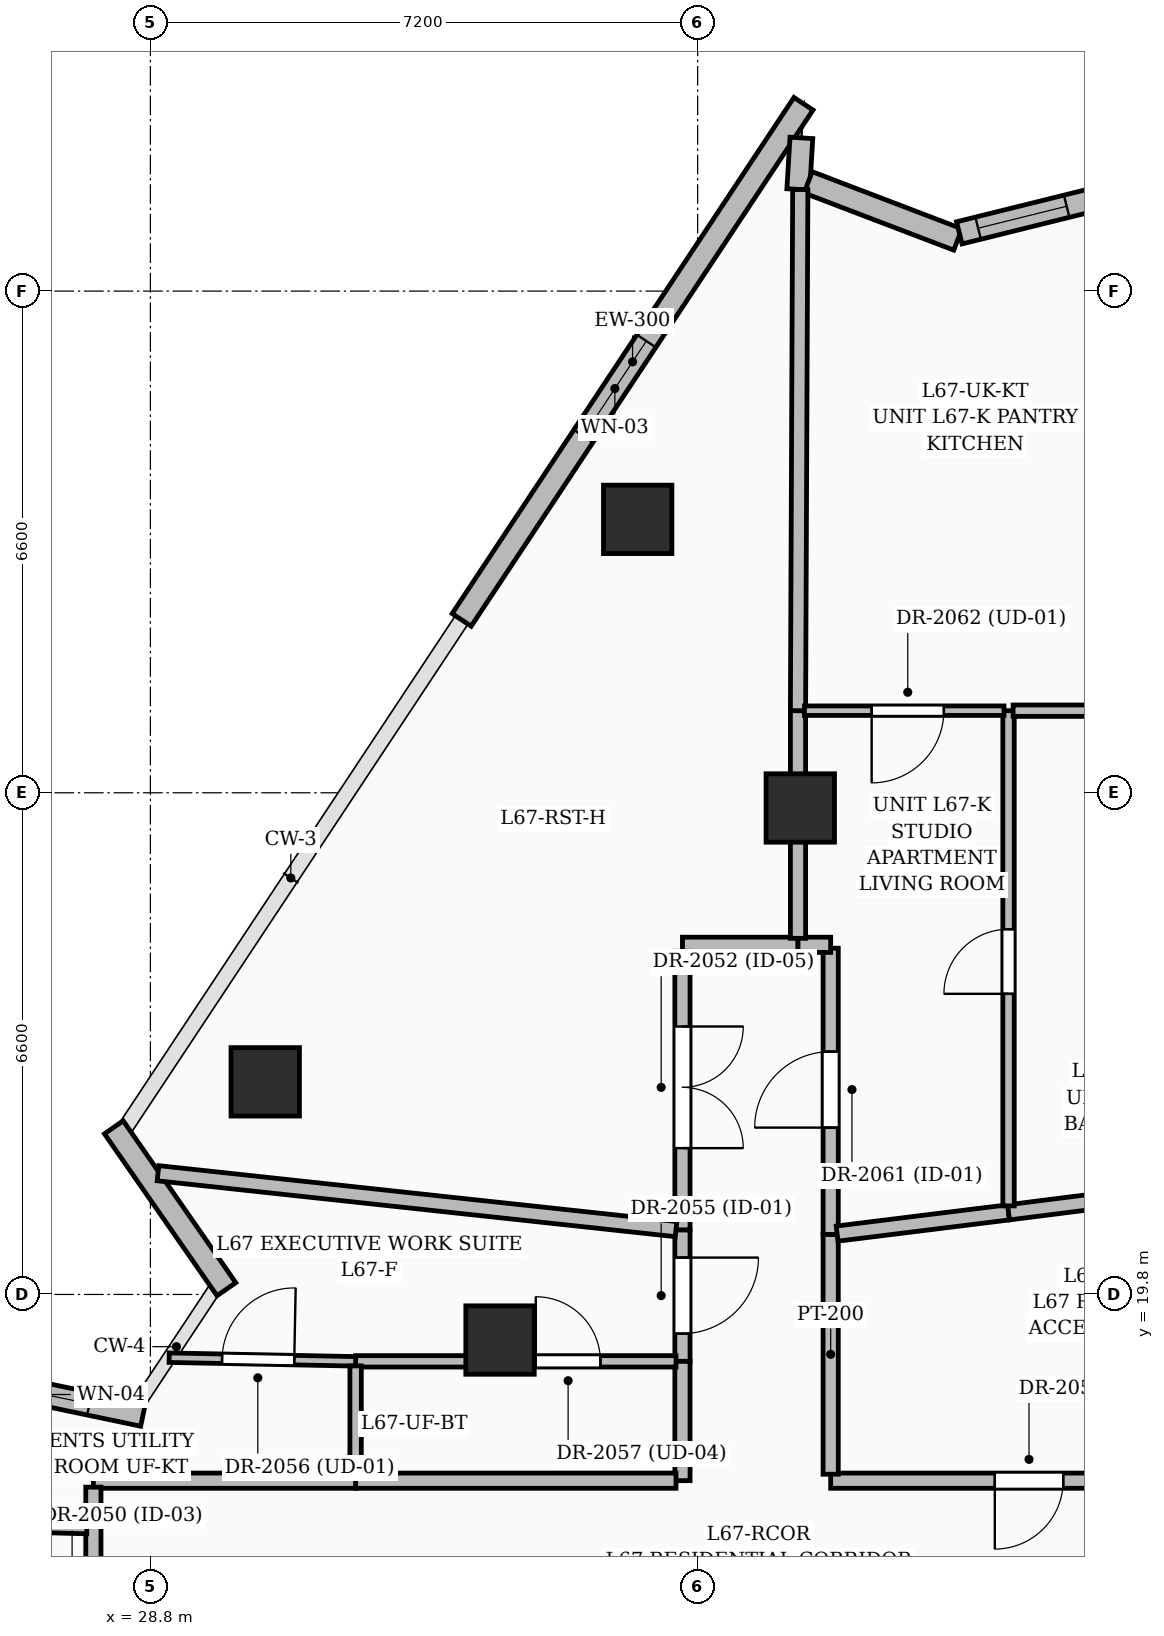
"""IFC4 building model, lengths in metres.
Left out: names, types, materials, properties, quantities, classifications, styles, units other than length and angle.
Written with IfcOpenShell. Run it as: python <this file> out.ifc"""

import sys

from ifc_helpers import new_model, si_unit, direction, frame, frame_2d, origin, origin_2d, place, context, subcontext, project, spatial, rectangle, extrude, element, fill, save


model = new_model("IFC4")
c1 = context("Model", 3, precision=1e-05, world=origin(), true_north=direction((0.0, 1.0)))
c2 = subcontext(c1, "Body", "Model", "MODEL_VIEW")
j1 = project(units=[si_unit("LENGTHUNIT", "METRE"), si_unit("PLANEANGLEUNIT", "RADIAN")], contexts=[c1])
p1 = place(None, origin())
s1 = spatial("IfcSite", under=j1, at=p1, CompositionType="ELEMENT")
p2 = place(p1, origin())
s2 = spatial("IfcBuilding", under=s1, at=p2, CompositionType="ELEMENT")
p3 = place(p2, frame((0.0, 0.0, 259.5)))
s3 = spatial("IfcBuildingStorey", under=s2, at=p3, CompositionType="ELEMENT", Elevation=259.5)
for number, where, z_axis, x_axis in (
    (1, (37.35, 26.2, 0.0), (0.0, 0.0, 1.0), (1.0, 0.0, 0.0)),
    (2, (33.4, 19.2, 0.0), (0.0, 0.0, 1.0), (1.0, 0.0, 0.0)),
    (3, (35.211, 29.997, 0.0), (0.0, 0.0, 1.0), (1.0, 0.0, 0.0)),
    (4, (30.311, 22.597, 0.0), (0.0, 0.0, 1.0), (1.0, 0.0, 0.0)),
):
    element("IfcColumn", number, at=place(p3, frame(where, z_axis=z_axis, x_axis=x_axis)), inside=s3, PredefinedType="COLUMN", context=c2, shape_type="SweptSolid", body=[
        extrude(rectangle(XDim=0.9, YDim=0.9, at=origin_2d()), origin(), (0.0, 0.0, 1.0), 3.75),
    ])
p4 = place(p3, frame((26.164, 18.745, 0.0), z_axis=(0.0, 0.0, 1.0), x_axis=(0.978800719283, -0.204814921162, 0.0)))
e5 = element("IfcWall", 5, at=p4, inside=s3, PredefinedType="SOLIDWALL", context=c2, shape_type="SweptSolid", body=[
    extrude(rectangle(XDim=2.594, YDim=0.3, at=frame_2d((1.297, 0.0))), origin(), (0.0, 0.0, 1.0), 2.825),
])
p5 = place(p4, frame((0.675, 0.0, 0.8)))
e6 = element("IfcOpeningElement", 6, at=p5, cuts=e5, PredefinedType="OPENING", context=c2, shape_type="SweptSolid", body=[
    extrude(rectangle(XDim=1.2, YDim=1.8, at=frame_2d((0.6, 0.9))), frame((0.0, 0.16, 0.0), z_axis=(0.0, -1.0, 0.0), x_axis=(1.0, 0.0, 0.0)), (0.0, 0.0, 1.0), 0.32),
])
p6 = place(p3, frame((29.8, 19.869, 0.0), z_axis=(0.0, 0.0, 1.0), x_axis=(-0.570863153193, 0.821045224288, 0.0)))
e7 = element("IfcWall", 7, at=p6, inside=s3, PredefinedType="SOLIDWALL", context=c2, shape_type="SweptSolid", body=[
    extrude(rectangle(XDim=2.594, YDim=0.3, at=frame_2d((1.297, 0.0))), origin(), (0.0, 0.0, 1.0), 2.825),
])
p7 = place(p3, frame((32.896, 28.675, 0.0), z_axis=(0.0, 0.0, 1.0), x_axis=(0.552110297452, 0.83377108336, 0.0)))
e8 = element("IfcWall", 8, at=p7, inside=s3, PredefinedType="SOLIDWALL", context=c2, shape_type="SweptSolid", body=[
    extrude(rectangle(XDim=8.144, YDim=0.3, at=frame_2d((4.072, 0.0))), origin(), (0.0, 0.0, 1.0), 3.5),
])
p8 = place(p7, frame((2.9, 0.0, 0.6)))
e9 = element("IfcOpeningElement", 9, at=p8, cuts=e8, PredefinedType="OPENING", context=c2, shape_type="SweptSolid", body=[
    extrude(rectangle(XDim=1.5, YDim=2.1, at=frame_2d((0.75, 1.05))), frame((0.0, 0.16, 0.0), z_axis=(0.0, -1.0, 0.0), x_axis=(1.0, 0.0, 0.0)), (0.0, 0.0, 1.0), 0.32),
])
p9 = place(p3, frame((37.365, 35.016, 0.0), z_axis=(0.0, 0.0, 1.0), x_axis=(-0.060701101821, -0.998155987929, 0.0)))
e10 = element("IfcWall", 10, at=p9, inside=s3, PredefinedType="SOLIDWALL", context=c2, shape_type="SweptSolid", body=[
    extrude(rectangle(XDim=0.68, YDim=0.3, at=frame_2d((0.34, 0.0))), origin(), (0.0, 0.0, 1.0), 3.5),
])
p10 = place(p3, frame((37.454, 34.431, 0.0), z_axis=(0.0, 0.0, 1.0), x_axis=(0.934285742141, -0.356525107155, 0.0)))
e11 = element("IfcWall", 11, at=p10, inside=s3, PredefinedType="SOLIDWALL", context=c2, shape_type="SweptSolid", body=[
    extrude(rectangle(XDim=2.108, YDim=0.3, at=frame_2d((1.054, 0.0))), origin(), (0.0, 0.0, 1.0), 3.5),
])
p11 = place(p3, frame((39.442, 33.766, 0.0), z_axis=(0.0, 0.0, 1.0), x_axis=(0.970636719037, 0.240550118805, 0.0)))
e12 = element("IfcWall", 12, at=p11, inside=s3, PredefinedType="SOLIDWALL", context=c2, shape_type="SweptSolid", body=[
    extrude(rectangle(XDim=2.084, YDim=0.3, at=frame_2d((1.042, 0.0))), origin(), (0.0, 0.0, 1.0), 3.5),
])
p12 = place(p11, frame((0.255, 0.0, 0.8)))
e13 = element("IfcOpeningElement", 13, at=p12, cuts=e12, PredefinedType="OPENING", context=c2, shape_type="SweptSolid", body=[
    extrude(rectangle(XDim=1.2, YDim=1.8, at=frame_2d((0.6, 0.9))), frame((0.0, 0.16, 0.0), z_axis=(0.0, -1.0, 0.0), x_axis=(1.0, 0.0, 0.0)), (0.0, 0.0, 1.0), 0.32),
])
p13 = place(p3, frame((28.05, 16.75, 0.0), z_axis=(0.0, 0.0, 1.0), x_axis=(0.0, -1.0, 0.0)))
e14 = element("IfcWall", 14, at=p13, inside=s3, PredefinedType="PARTITIONING", context=c2, shape_type="SweptSolid", body=[
    extrude(rectangle(XDim=1.7, YDim=0.2, at=frame_2d((0.85, 0.0))), origin(), (0.0, 0.0, 1.0), 3.5),
])
p14 = place(p13, frame((0.556, 0.0, 0.0)))
e15 = element("IfcOpeningElement", 15, at=p14, cuts=e14, PredefinedType="OPENING", context=c2, shape_type="SweptSolid", body=[
    extrude(rectangle(XDim=0.9, YDim=2.1, at=frame_2d((0.45, 1.05))), frame((0.0, 0.11, 0.0), z_axis=(0.0, -1.0, 0.0), x_axis=(1.0, 0.0, 0.0)), (0.0, 0.0, 1.0), 0.22),
])
p15 = place(p3, frame((35.8, 20.65, 0.0), z_axis=(0.0, 0.0, 1.0), x_axis=(0.0, -1.0, 0.0)))
e16 = element("IfcWall", 16, at=p15, inside=s3, PredefinedType="PARTITIONING", context=c2, shape_type="SweptSolid", body=[
    extrude(rectangle(XDim=1.73, YDim=0.2, at=frame_2d((0.865, 0.0))), origin(), (0.0, 0.0, 1.0), 3.5),
])
p16 = place(p15, frame((0.365, 0.0, 0.0)))
e17 = element("IfcOpeningElement", 17, at=p16, cuts=e16, PredefinedType="OPENING", context=c2, shape_type="SweptSolid", body=[
    extrude(rectangle(XDim=1.0, YDim=2.2, at=frame_2d((0.5, 1.1))), frame((0.0, 0.11, 0.0), z_axis=(0.0, -1.0, 0.0), x_axis=(1.0, 0.0, 0.0)), (0.0, 0.0, 1.0), 0.22),
])
p17 = place(p3, frame((35.8, 18.92, 0.0), z_axis=(0.0, 0.0, 1.0), x_axis=(0.0, -1.0, 0.0)))
e18 = element("IfcWall", 18, at=p17, inside=s3, PredefinedType="PARTITIONING", context=c2, shape_type="SweptSolid", body=[
    extrude(rectangle(XDim=1.57, YDim=0.2, at=frame_2d((0.785, 0.0))), origin(), (0.0, 0.0, 1.0), 3.5),
])
p18 = place(p3, frame((35.715, 17.35, 0.0), z_axis=(0.0, 0.0, 1.0), x_axis=(-1.0, 0.0, 0.0)))
e19 = element("IfcWall", 19, at=p18, inside=s3, PredefinedType="PARTITIONING", context=c2, shape_type="SweptSolid", body=[
    extrude(rectangle(XDim=4.215, YDim=0.2, at=frame_2d((2.107, 0.0))), origin(), (0.0, 0.0, 1.0), 2.685),
])
p19 = place(p3, frame((31.5, 17.35, 0.0), z_axis=(0.0, 0.0, 1.0), x_axis=(-1.0, 0.0, 0.0)))
e20 = element("IfcWall", 20, at=p19, inside=s3, PredefinedType="PARTITIONING", context=c2, shape_type="SweptSolid", body=[
    extrude(rectangle(XDim=3.45, YDim=0.2, at=frame_2d((1.725, 0.0))), origin(), (0.0, 0.0, 1.0), 3.5),
])
p20 = place(p3, frame((28.05, 17.265, 0.0), z_axis=(0.0, 0.0, 1.0), x_axis=(0.0, -1.0, 0.0)))
e21 = element("IfcWall", 21, at=p20, inside=s3, PredefinedType="PARTITIONING", context=c2, shape_type="SweptSolid", body=[
    extrude(rectangle(XDim=0.515, YDim=0.2, at=frame_2d((0.257, 0.0))), origin(), (0.0, 0.0, 1.0), 3.5),
])
p21 = place(p3, frame((42.85, 17.35, 0.0), z_axis=(0.0, 0.0, 1.0), x_axis=(-1.0, 0.0, 0.0)))
e22 = element("IfcWall", 22, at=p21, inside=s3, PredefinedType="PARTITIONING", context=c2, shape_type="SweptSolid", body=[
    extrude(rectangle(XDim=5.1, YDim=0.2, at=frame_2d((2.55, 0.0))), origin(), (0.0, 0.0, 1.0), 3.5),
])
p22 = place(p21, frame((2.041, 0.0, 0.0)))
e23 = element("IfcOpeningElement", 23, at=p22, cuts=e22, PredefinedType="OPENING", context=c2, shape_type="SweptSolid", body=[
    extrude(rectangle(XDim=0.9, YDim=2.1, at=frame_2d((0.45, 1.05))), frame((0.0, 0.11, 0.0), z_axis=(0.0, -1.0, 0.0), x_axis=(1.0, 0.0, 0.0)), (0.0, 0.0, 1.0), 0.22),
])
p23 = place(p3, frame((37.75, 17.435, 0.0), z_axis=(0.0, 0.0, 1.0), x_axis=(0.0, 1.0, 0.0)))
e24 = element("IfcWall", 24, at=p23, inside=s3, PredefinedType="PARTITIONING", context=c2, shape_type="SweptSolid", body=[
    extrude(rectangle(XDim=3.155, YDim=0.2, at=frame_2d((1.578, 0.0))), origin(), (0.0, 0.0, 1.0), 3.5),
])
p24 = place(p3, frame((37.32, 24.4, 0.0), z_axis=(0.0, 0.0, 1.0), x_axis=(-1.0, 0.0, 0.0)))
e25 = element("IfcWall", 25, at=p24, inside=s3, PredefinedType="PARTITIONING", context=c2, shape_type="SweptSolid", body=[
    extrude(rectangle(XDim=1.52, YDim=0.2, at=frame_2d((0.76, 0.0))), origin(), (0.0, 0.0, 1.0), 2.685),
])
p25 = place(p3, frame((35.8, 24.315, 0.0), z_axis=(0.0, 0.0, 1.0), x_axis=(0.0, -1.0, 0.0)))
e26 = element("IfcWall", 26, at=p25, inside=s3, PredefinedType="PARTITIONING", context=c2, shape_type="SweptSolid", body=[
    extrude(rectangle(XDim=3.665, YDim=0.2, at=frame_2d((1.833, 0.0))), origin(), (0.0, 0.0, 1.0), 2.685),
])
p26 = place(p25, frame((0.99, 0.0, 0.0)))
e27 = element("IfcOpeningElement", 27, at=p26, cuts=e26, PredefinedType="OPENING", context=c2, shape_type="SweptSolid", body=[
    extrude(rectangle(XDim=1.6, YDim=2.3, at=frame_2d((0.8, 1.15))), frame((0.0, 0.11, 0.0), z_axis=(0.0, -1.0, 0.0), x_axis=(1.0, 0.0, 0.0)), (0.0, 0.0, 1.0), 0.22),
])
p27 = place(p3, frame((37.75, 20.59, 0.0), z_axis=(0.0, 0.0, 1.0), x_axis=(0.0, 1.0, 0.0)))
e28 = element("IfcWall", 28, at=p27, inside=s3, PredefinedType="PARTITIONING", context=c2, shape_type="SweptSolid", body=[
    extrude(rectangle(XDim=3.765, YDim=0.2, at=frame_2d((1.882, 0.0))), origin(), (0.0, 0.0, 1.0), 3.5),
])
p28 = place(p27, frame((1.405, 0.0, 0.0)))
e29 = element("IfcOpeningElement", 29, at=p28, cuts=e28, PredefinedType="OPENING", context=c2, shape_type="SweptSolid", body=[
    extrude(rectangle(XDim=1.0, YDim=2.2, at=frame_2d((0.5, 1.1))), frame((0.0, 0.11, 0.0), z_axis=(0.0, -1.0, 0.0), x_axis=(1.0, 0.0, 0.0)), (0.0, 0.0, 1.0), 0.22),
])
p29 = place(p3, frame((37.75, 24.4, 0.0), z_axis=(0.0, 0.0, 1.0), x_axis=(-1.0, 0.0, 0.0)))
e30 = element("IfcWall", 30, at=p29, inside=s3, PredefinedType="PARTITIONING", context=c2, shape_type="SweptSolid", body=[
    extrude(rectangle(XDim=0.43, YDim=0.2, at=frame_2d((0.215, 0.0))), origin(), (0.0, 0.0, 1.0), 3.5),
])
p30 = place(p3, frame((27.965, 16.751, 0.0), z_axis=(0.0, 0.0, 1.0), x_axis=(-0.99966592062, 0.025846608096, 0.0)))
e31 = element("IfcWall", 31, at=p30, inside=s3, PredefinedType="PARTITIONING", context=c2, shape_type="SweptSolid", body=[
    extrude(rectangle(XDim=2.777, YDim=0.2, at=frame_2d((1.389, 0.0))), origin(), (0.0, 0.0, 1.0), 3.5),
])
p31 = place(p3, frame((31.5, 18.92, 0.0), z_axis=(0.0, 0.0, 1.0), x_axis=(1.0, 0.0, 0.0)))
e32 = element("IfcWall", 32, at=p31, inside=s3, PredefinedType="PARTITIONING", context=c2, shape_type="SweptSolid", body=[
    extrude(rectangle(XDim=4.215, YDim=0.15, at=frame_2d((2.107, 0.0))), origin(), (0.0, 0.0, 1.0), 3.5),
])
p32 = place(p31, frame((2.371, 0.0, 0.0)))
e33 = element("IfcOpeningElement", 33, at=p32, cuts=e32, PredefinedType="OPENING", context=c2, shape_type="SweptSolid", body=[
    extrude(rectangle(XDim=0.85, YDim=2.1, at=frame_2d((0.425, 1.05))), frame((0.0, 0.085, 0.0), z_axis=(0.0, -1.0, 0.0), x_axis=(1.0, 0.0, 0.0)), (0.0, 0.0, 1.0), 0.17),
])
p33 = place(p3, frame((29.047, 18.968, 0.0), z_axis=(0.0, 0.0, 1.0), x_axis=(0.999807821657, -0.019604074934, 0.0)))
e34 = element("IfcWall", 34, at=p33, inside=s3, PredefinedType="PARTITIONING", context=c2, shape_type="SweptSolid", body=[
    extrude(rectangle(XDim=2.453, YDim=0.125, at=frame_2d((1.227, 0.0))), origin(), (0.0, 0.0, 1.0), 3.5),
])
p34 = place(p33, frame((0.696, 0.0, 0.0)))
e35 = element("IfcOpeningElement", 35, at=p34, cuts=e34, PredefinedType="OPENING", context=c2, shape_type="SweptSolid", body=[
    extrude(rectangle(XDim=0.95, YDim=2.2, at=frame_2d((0.475, 1.1))), frame((0.0, 0.072, 0.0), z_axis=(0.0, -1.0, 0.0), x_axis=(1.0, 0.0, 0.0)), (0.0, 0.0, 1.0), 0.145),
])
p35 = place(p3, frame((35.716, 20.66, 0.0), z_axis=(0.0, 0.0, 1.0), x_axis=(-0.994230064401, 0.107268723501, 0.0)))
e36 = element("IfcWall", 36, at=p35, inside=s3, PredefinedType="PARTITIONING", context=c2, shape_type="SweptSolid", body=[
    extrude(rectangle(XDim=6.855, YDim=0.2, at=frame_2d((3.428, 0.0))), origin(), (0.0, 0.0, 1.0), 2.685),
])
p36 = place(p3, frame((31.5, 18.86, 0.0), z_axis=(0.0, 0.0, 1.0), x_axis=(0.0, -1.0, 0.0)))
e37 = element("IfcWall", 37, at=p36, inside=s3, PredefinedType="PARTITIONING", context=c2, shape_type="SweptSolid", body=[
    extrude(rectangle(XDim=1.425, YDim=0.15, at=frame_2d((0.712, 0.0))), origin(), (0.0, 0.0, 1.0), 3.5),
])
p37 = place(p3, frame((40.09, 20.88, 0.0), z_axis=(0.0, 0.0, 1.0), x_axis=(-0.992420982951, -0.122884468503, 0.0)))
e38 = element("IfcWall", 38, at=p37, inside=s3, PredefinedType="PARTITIONING", context=c2, shape_type="SweptSolid", body=[
    extrude(rectangle(XDim=2.273, YDim=0.2, at=frame_2d((1.136, 0.0))), origin(), (0.0, 0.0, 1.0), 3.5),
])
p38 = place(p3, frame((42.766, 21.219, 0.0), z_axis=(0.0, 0.0, 1.0), x_axis=(-0.992052034516, -0.12582829893, 0.0)))
e39 = element("IfcWall", 39, at=p38, inside=s3, PredefinedType="PARTITIONING", context=c2, shape_type="SweptSolid", body=[
    extrude(rectangle(XDim=2.697, YDim=0.2, at=frame_2d((1.349, 0.0))), origin(), (0.0, 0.0, 1.0), 3.5),
])
p39 = place(p3, frame((37.32, 24.485, 0.0), z_axis=(0.0, 0.0, 1.0), x_axis=(0.0, 1.0, 0.0)))
e40 = element("IfcWall", 40, at=p39, inside=s3, PredefinedType="PARTITIONING", context=c2, shape_type="SweptSolid", body=[
    extrude(rectangle(XDim=2.995, YDim=0.2, at=frame_2d((1.498, 0.0))), origin(), (0.0, 0.0, 1.0), 2.685),
])
p40 = place(p3, frame((37.32, 27.48, 0.0), z_axis=(0.0, 0.0, 1.0), x_axis=(0.004379987898, 0.999990407807, 0.0)))
e41 = element("IfcWall", 41, at=p40, inside=s3, PredefinedType="PARTITIONING", context=c2, shape_type="SweptSolid", body=[
    extrude(rectangle(XDim=6.856, YDim=0.2, at=frame_2d((3.428, 0.0))), origin(), (0.0, 0.0, 1.0), 2.82),
])
p41 = place(p3, frame((40.09, 20.965, 0.0), z_axis=(0.0, 0.0, 1.0), x_axis=(0.0, 1.0, 0.0)))
e42 = element("IfcWall", 42, at=p41, inside=s3, PredefinedType="PARTITIONING", context=c2, shape_type="SweptSolid", body=[
    extrude(rectangle(XDim=6.515, YDim=0.15, at=frame_2d((3.257, 0.0))), origin(), (0.0, 0.0, 1.0), 2.685),
])
p42 = place(p41, frame((2.79, 0.0, 0.0)))
e43 = element("IfcOpeningElement", 43, at=p42, cuts=e42, PredefinedType="OPENING", context=c2, shape_type="SweptSolid", body=[
    extrude(rectangle(XDim=0.85, YDim=2.1, at=frame_2d((0.425, 1.05))), frame((0.0, 0.085, 0.0), z_axis=(0.0, -1.0, 0.0), x_axis=(1.0, 0.0, 0.0)), (0.0, 0.0, 1.0), 0.17),
])
p43 = place(p3, frame((40.03, 27.48, 0.0), z_axis=(0.0, 0.0, 1.0), x_axis=(-1.0, 0.0, 0.0)))
e44 = element("IfcWall", 44, at=p43, inside=s3, PredefinedType="PARTITIONING", context=c2, shape_type="SweptSolid", body=[
    extrude(rectangle(XDim=2.625, YDim=0.125, at=frame_2d((1.312, 0.0))), origin(), (0.0, 0.0, 1.0), 3.061),
])
p44 = place(p43, frame((0.791, 0.0, 0.0)))
e45 = element("IfcOpeningElement", 45, at=p44, cuts=e44, PredefinedType="OPENING", context=c2, shape_type="SweptSolid", body=[
    extrude(rectangle(XDim=0.95, YDim=2.2, at=frame_2d((0.475, 1.1))), frame((0.0, 0.072, 0.0), z_axis=(0.0, -1.0, 0.0), x_axis=(1.0, 0.0, 0.0)), (0.0, 0.0, 1.0), 0.145),
])
p45 = place(p3, frame((42.765, 27.48, 0.0), z_axis=(0.0, 0.0, 1.0), x_axis=(-1.0, 0.0, 0.0)))
e46 = element("IfcWall", 46, at=p45, inside=s3, PredefinedType="PARTITIONING", context=c2, shape_type="SweptSolid", body=[
    extrude(rectangle(XDim=2.615, YDim=0.15, at=frame_2d((1.308, 0.0))), origin(), (0.0, 0.0, 1.0), 2.764),
])
p46 = place(p5, origin())
e47 = element("IfcWindow", 47, at=p46, inside=s3, PartitioningType="SINGLE_PANEL", PredefinedType="WINDOW", context=c2, shape_type="SweptSolid", body=[
    extrude(rectangle(XDim=1.2, YDim=1.8, at=frame_2d((0.6, 0.9))), frame((0.0, 0.03, 0.0), z_axis=(0.0, -1.0, 0.0), x_axis=(1.0, 0.0, 0.0)), (0.0, 0.0, 1.0), 0.06),
])
fill(e6, e47)
p47 = place(p8, origin())
e48 = element("IfcWindow", 48, at=p47, inside=s3, PartitioningType="SINGLE_PANEL", PredefinedType="WINDOW", context=c2, shape_type="SweptSolid", body=[
    extrude(rectangle(XDim=1.5, YDim=2.1, at=frame_2d((0.75, 1.05))), frame((0.0, 0.03, 0.0), z_axis=(0.0, -1.0, 0.0), x_axis=(1.0, 0.0, 0.0)), (0.0, 0.0, 1.0), 0.06),
])
fill(e9, e48)
p48 = place(p12, origin())
e49 = element("IfcWindow", 49, at=p48, inside=s3, PartitioningType="SINGLE_PANEL", PredefinedType="WINDOW", context=c2, shape_type="SweptSolid", body=[
    extrude(rectangle(XDim=1.2, YDim=1.8, at=frame_2d((0.6, 0.9))), frame((0.0, 0.03, 0.0), z_axis=(0.0, -1.0, 0.0), x_axis=(1.0, 0.0, 0.0)), (0.0, 0.0, 1.0), 0.06),
])
fill(e13, e49)
p49 = place(p22, origin())
e50 = element("IfcDoor", 50, at=p49, inside=s3, OperationType="SINGLE_SWING_RIGHT", PredefinedType="DOOR", context=c2, shape_type="SweptSolid", body=[
    extrude(rectangle(XDim=0.9, YDim=2.1, at=frame_2d((0.45, 1.05))), frame((0.0, 0.025, 0.0), z_axis=(0.0, -1.0, 0.0), x_axis=(1.0, 0.0, 0.0)), (0.0, 0.0, 1.0), 0.05),
])
fill(e23, e50)
p50 = place(p26, origin())
e51 = element("IfcDoor", 51, at=p50, inside=s3, OperationType="DOUBLE_DOOR_SINGLE_SWING", PredefinedType="DOOR", context=c2, shape_type="SweptSolid", body=[
    extrude(rectangle(XDim=1.6, YDim=2.3, at=frame_2d((0.8, 1.15))), frame((0.0, 0.025, 0.0), z_axis=(0.0, -1.0, 0.0), x_axis=(1.0, 0.0, 0.0)), (0.0, 0.0, 1.0), 0.05),
])
fill(e27, e51)
p51 = place(p16, origin())
e52 = element("IfcDoor", 52, at=p51, inside=s3, OperationType="SINGLE_SWING_LEFT", PredefinedType="DOOR", context=c2, shape_type="SweptSolid", body=[
    extrude(rectangle(XDim=1.0, YDim=2.2, at=frame_2d((0.5, 1.1))), frame((0.0, 0.025, 0.0), z_axis=(0.0, -1.0, 0.0), x_axis=(1.0, 0.0, 0.0)), (0.0, 0.0, 1.0), 0.05),
])
fill(e17, e52)
p52 = place(p34, origin())
e53 = element("IfcDoor", 53, at=p52, inside=s3, OperationType="SINGLE_SWING_RIGHT", PredefinedType="DOOR", context=c2, shape_type="SweptSolid", body=[
    extrude(rectangle(XDim=0.95, YDim=2.2, at=frame_2d((0.475, 1.1))), frame((0.0, 0.025, 0.0), z_axis=(0.0, -1.0, 0.0), x_axis=(1.0, 0.0, 0.0)), (0.0, 0.0, 1.0), 0.05),
])
fill(e35, e53)
p53 = place(p32, origin())
e54 = element("IfcDoor", 54, at=p53, inside=s3, OperationType="SINGLE_SWING_LEFT", PredefinedType="DOOR", context=c2, shape_type="SweptSolid", body=[
    extrude(rectangle(XDim=0.85, YDim=2.1, at=frame_2d((0.425, 1.05))), frame((0.0, 0.025, 0.0), z_axis=(0.0, -1.0, 0.0), x_axis=(1.0, 0.0, 0.0)), (0.0, 0.0, 1.0), 0.05),
])
fill(e33, e54)
p54 = place(p28, origin())
e55 = element("IfcDoor", 55, at=p54, inside=s3, OperationType="SINGLE_SWING_LEFT", PredefinedType="DOOR", context=c2, shape_type="SweptSolid", body=[
    extrude(rectangle(XDim=1.0, YDim=2.2, at=frame_2d((0.5, 1.1))), frame((0.0, 0.025, 0.0), z_axis=(0.0, -1.0, 0.0), x_axis=(1.0, 0.0, 0.0)), (0.0, 0.0, 1.0), 0.05),
])
fill(e29, e55)
p55 = place(p44, origin())
e56 = element("IfcDoor", 56, at=p55, inside=s3, OperationType="SINGLE_SWING_RIGHT", PredefinedType="DOOR", context=c2, shape_type="SweptSolid", body=[
    extrude(rectangle(XDim=0.95, YDim=2.2, at=frame_2d((0.475, 1.1))), frame((0.0, 0.025, 0.0), z_axis=(0.0, -1.0, 0.0), x_axis=(1.0, 0.0, 0.0)), (0.0, 0.0, 1.0), 0.05),
])
fill(e45, e56)
p56 = place(p42, origin())
e57 = element("IfcDoor", 57, at=p56, inside=s3, OperationType="SINGLE_SWING_LEFT", PredefinedType="DOOR", context=c2, shape_type="SweptSolid", body=[
    extrude(rectangle(XDim=0.85, YDim=2.1, at=frame_2d((0.425, 1.05))), frame((0.0, 0.025, 0.0), z_axis=(0.0, -1.0, 0.0), x_axis=(1.0, 0.0, 0.0)), (0.0, 0.0, 1.0), 0.05),
])
fill(e43, e57)
save(model, sys.argv[1])
